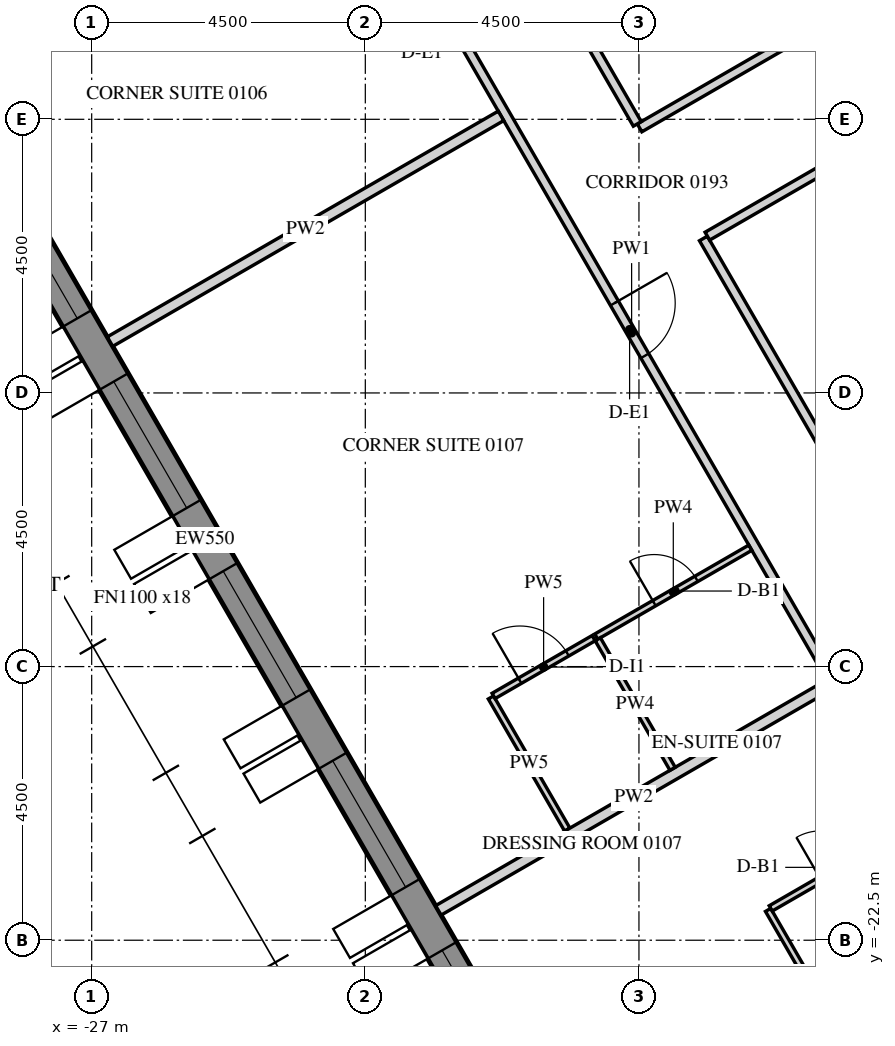
"""IFC4 building model, lengths in metres.
Left out: names, types, materials, properties, quantities, classifications, styles, units other than length and angle.
Written with IfcOpenShell. Run it as: python <this file> out.ifc"""

import sys

from ifc_helpers import new_model, si_unit, direction, frame, frame_2d, origin, place, context, subcontext, project, spatial, polyline, rectangle, outline, extrude, element, fill, save


model = new_model("IFC4")
c1 = context("Model", 3, precision=1e-05, world=origin(), true_north=direction((0.0, 1.0)))
c2 = subcontext(c1, "Body", "Model", "MODEL_VIEW")
j1 = project(units=[si_unit("LENGTHUNIT", "METRE"), si_unit("PLANEANGLEUNIT", "RADIAN")], contexts=[c1])
p1 = place(None, origin())
s1 = spatial("IfcSite", under=j1, at=p1, CompositionType="ELEMENT")
p2 = place(p1, origin())
s2 = spatial("IfcBuilding", under=s1, at=p2, CompositionType="ELEMENT")
p3 = place(p2, frame((0.0, 0.0, 37.5)))
s3 = spatial("IfcBuildingStorey", under=s2, at=p3, CompositionType="ELEMENT", Elevation=37.5)
p4 = place(p3, frame((-32.655, -2.89, -0.15), z_axis=(0.0, 0.0, 1.0), x_axis=(0.499997711317, -0.866026725152, 0.0)))
e1 = element("IfcWall", 1, at=p4, inside=s3, PredefinedType="SOLIDWALL", context=c2, shape_type="SweptSolid", body=[
    extrude(outline(polyline([(-0.022, -0.275), (30.097, -0.275), (30.045, 0.275), (0.022, 0.275), (-0.022, -0.275)])), origin(), (0.0, 0.0, 1.0), 3.9),
])
p5 = place(p4, frame((1.236, 0.0, 1.05)))
e2 = element("IfcOpeningElement", 2, at=p5, cuts=e1, PredefinedType="OPENING", context=c2, shape_type="SweptSolid", body=[
    extrude(rectangle(XDim=2.4, YDim=2.4, at=frame_2d((1.2, 1.2))), frame((0.0, 0.285, 0.0), z_axis=(0.0, -1.0, 0.0), x_axis=(1.0, 0.0, 0.0)), (0.0, 0.0, 1.0), 0.57),
])
p6 = place(p4, frame((4.835, 0.0, 1.05)))
e3 = element("IfcOpeningElement", 3, at=p6, cuts=e1, PredefinedType="OPENING", context=c2, shape_type="SweptSolid", body=[
    extrude(rectangle(XDim=2.4, YDim=2.4, at=frame_2d((1.2, 1.2))), frame((0.0, 0.285, 0.0), z_axis=(0.0, -1.0, 0.0), x_axis=(1.0, 0.0, 0.0)), (0.0, 0.0, 1.0), 0.57),
])
p7 = place(p4, frame((8.436, 0.0, 1.05)))
e4 = element("IfcOpeningElement", 4, at=p7, cuts=e1, PredefinedType="OPENING", context=c2, shape_type="SweptSolid", body=[
    extrude(rectangle(XDim=2.4, YDim=2.4, at=frame_2d((1.2, 1.2))), frame((0.0, 0.285, 0.0), z_axis=(0.0, -1.0, 0.0), x_axis=(1.0, 0.0, 0.0)), (0.0, 0.0, 1.0), 0.57),
])
p8 = place(p4, frame((12.035, 0.0, 1.05)))
e5 = element("IfcOpeningElement", 5, at=p8, cuts=e1, PredefinedType="OPENING", context=c2, shape_type="SweptSolid", body=[
    extrude(rectangle(XDim=2.4, YDim=2.4, at=frame_2d((1.2, 1.2))), frame((0.0, 0.285, 0.0), z_axis=(0.0, -1.0, 0.0), x_axis=(1.0, 0.0, 0.0)), (0.0, 0.0, 1.0), 0.57),
])
p9 = place(p4, frame((15.635, 0.0, 1.05)))
e6 = element("IfcOpeningElement", 6, at=p9, cuts=e1, PredefinedType="OPENING", context=c2, shape_type="SweptSolid", body=[
    extrude(rectangle(XDim=2.4, YDim=2.4, at=frame_2d((1.2, 1.2))), frame((0.0, 0.285, 0.0), z_axis=(0.0, -1.0, 0.0), x_axis=(1.0, 0.0, 0.0)), (0.0, 0.0, 1.0), 0.57),
])
p10 = place(p4, frame((19.236, 0.0, 1.05)))
e7 = element("IfcOpeningElement", 7, at=p10, cuts=e1, PredefinedType="OPENING", context=c2, shape_type="SweptSolid", body=[
    extrude(rectangle(XDim=2.4, YDim=2.4, at=frame_2d((1.2, 1.2))), frame((0.0, 0.285, 0.0), z_axis=(0.0, -1.0, 0.0), x_axis=(1.0, 0.0, 0.0)), (0.0, 0.0, 1.0), 0.57),
])
p11 = place(p4, frame((22.835, 0.0, 1.05)))
e8 = element("IfcOpeningElement", 8, at=p11, cuts=e1, PredefinedType="OPENING", context=c2, shape_type="SweptSolid", body=[
    extrude(rectangle(XDim=2.4, YDim=2.4, at=frame_2d((1.2, 1.2))), frame((0.0, 0.285, 0.0), z_axis=(0.0, -1.0, 0.0), x_axis=(1.0, 0.0, 0.0)), (0.0, 0.0, 1.0), 0.57),
])
p12 = place(p4, frame((26.436, 0.0, 1.05)))
e9 = element("IfcOpeningElement", 9, at=p12, cuts=e1, PredefinedType="OPENING", context=c2, shape_type="SweptSolid", body=[
    extrude(rectangle(XDim=2.4, YDim=2.4, at=frame_2d((1.2, 1.2))), frame((0.0, 0.285, 0.0), z_axis=(0.0, -1.0, 0.0), x_axis=(1.0, 0.0, 0.0)), (0.0, 0.0, 1.0), 0.57),
])
p13 = place(p3, frame((-15.819, 0.0, -0.15), z_axis=(0.0, 0.0, 1.0), x_axis=(0.499999880136, -0.866025472988, 0.0)))
e10 = element("IfcWall", 10, at=p13, inside=s3, PredefinedType="SHEAR", context=c2, shape_type="SweptSolid", body=[
    extrude(outline(polyline([(-0.173, -0.3), (15.993, -0.3), (15.646, 0.3), (0.173, 0.3), (-0.173, -0.3)])), origin(), (0.0, 0.0, 1.0), 3.9),
])
p14 = place(p13, frame((6.981, 0.0, 0.15)))
e11 = element("IfcOpeningElement", 11, at=p14, cuts=e10, PredefinedType="OPENING", context=c2, shape_type="SweptSolid", body=[
    extrude(rectangle(XDim=1.8, YDim=2.4, at=frame_2d((0.9, 1.2))), frame((0.0, 0.31, 0.0), z_axis=(0.0, -1.0, 0.0), x_axis=(1.0, 0.0, 0.0)), (0.0, 0.0, 1.0), 0.62),
])
p15 = place(p3, frame((-24.09, -2.175, 0.0), z_axis=(0.0, 0.0, 1.0), x_axis=(0.499996832073, -0.86602723278, 0.0)))
e12 = element("IfcWall", 12, at=p15, inside=s3, PredefinedType="PARTITIONING", context=c2, shape_type="SweptSolid", body=[
    extrude(rectangle(XDim=23.877, YDim=0.15, at=frame_2d((11.938, 0.0))), origin(), (0.0, 0.0, 1.0), 2.988),
])
p16 = place(p15, frame((4.543, 0.0, 0.0)))
e13 = element("IfcOpeningElement", 13, at=p16, cuts=e12, PredefinedType="OPENING", context=c2, shape_type="SweptSolid", body=[
    extrude(rectangle(XDim=1.0, YDim=2.1, at=frame_2d((0.5, 1.05))), frame((0.0, 0.085, 0.0), z_axis=(0.0, -1.0, 0.0), x_axis=(1.0, 0.0, 0.0)), (0.0, 0.0, 1.0), 0.17),
])
p17 = place(p15, frame((11.372, 0.0, 0.0)))
e14 = element("IfcOpeningElement", 14, at=p17, cuts=e12, PredefinedType="OPENING", context=c2, shape_type="SweptSolid", body=[
    extrude(rectangle(XDim=1.0, YDim=2.1, at=frame_2d((0.5, 1.05))), frame((0.0, 0.085, 0.0), z_axis=(0.0, -1.0, 0.0), x_axis=(1.0, 0.0, 0.0)), (0.0, 0.0, 1.0), 0.17),
])
p18 = place(p15, frame((19.425, 0.0, 0.0)))
e15 = element("IfcOpeningElement", 15, at=p18, cuts=e12, PredefinedType="OPENING", context=c2, shape_type="SweptSolid", body=[
    extrude(rectangle(XDim=1.0, YDim=2.1, at=frame_2d((0.5, 1.05))), frame((0.0, 0.085, 0.0), z_axis=(0.0, -1.0, 0.0), x_axis=(1.0, 0.0, 0.0)), (0.0, 0.0, 1.0), 0.17),
])
p19 = place(p3, frame((-12.664, -6.066, 0.0), z_axis=(0.0, 0.0, 1.0), x_axis=(-0.866023618125, -0.500003092839, 0.0)))
e16 = element("IfcWall", 16, at=p19, inside=s3, PredefinedType="PARTITIONING", context=c2, shape_type="SweptSolid", body=[
    extrude(rectangle(XDim=6.15, YDim=0.15, at=frame_2d((3.075, 0.0))), origin(), (0.0, 0.0, 1.0), 2.988),
])
p20 = place(p3, frame((-18.027, -9.076, 0.0), z_axis=(0.0, 0.0, 1.0), x_axis=(-0.500007318041, 0.86602117867, 0.0)))
e17 = element("IfcWall", 17, at=p20, inside=s3, PredefinedType="PARTITIONING", context=c2, shape_type="SweptSolid", body=[
    extrude(rectangle(XDim=8.383, YDim=0.15, at=frame_2d((4.191, 0.0))), origin(), (0.0, 0.0, 1.0), 2.988),
])
p21 = place(p20, frame((3.742, 0.0, 0.0)))
e18 = element("IfcOpeningElement", 18, at=p21, cuts=e17, PredefinedType="OPENING", context=c2, shape_type="SweptSolid", body=[
    extrude(rectangle(XDim=0.9, YDim=2.1, at=frame_2d((0.45, 1.05))), frame((0.0, 0.085, 0.0), z_axis=(0.0, -1.0, 0.0), x_axis=(1.0, 0.0, 0.0)), (0.0, 0.0, 1.0), 0.17),
])
p22 = place(p3, frame((-11.197, -20.907, 0.0), z_axis=(0.0, 0.0, 1.0), x_axis=(-0.500004557924, 0.86602277225, 0.0)))
e19 = element("IfcWall", 19, at=p22, inside=s3, PredefinedType="PARTITIONING", context=c2, shape_type="SweptSolid", body=[
    extrude(rectangle(XDim=11.487, YDim=0.15, at=frame_2d((5.743, 0.0))), origin(), (0.0, 0.0, 1.0), 2.988),
])
p23 = place(p22, frame((5.293, 0.0, 0.0)))
e20 = element("IfcOpeningElement", 20, at=p23, cuts=e19, PredefinedType="OPENING", context=c2, shape_type="SweptSolid", body=[
    extrude(rectangle(XDim=0.9, YDim=2.1, at=frame_2d((0.45, 1.05))), frame((0.0, 0.085, 0.0), z_axis=(0.0, -1.0, 0.0), x_axis=(1.0, 0.0, 0.0)), (0.0, 0.0, 1.0), 0.17),
])
p24 = place(p3, frame((-16.875, -10.922, 0.0), z_axis=(0.0, 0.0, 1.0), x_axis=(0.866023634079, 0.500003065207, 0.0)))
e21 = element("IfcWall", 21, at=p24, inside=s3, PredefinedType="PARTITIONING", context=c2, shape_type="SweptSolid", body=[
    extrude(rectangle(XDim=6.075, YDim=0.15, at=frame_2d((3.038, 0.0))), origin(), (0.0, 0.0, 1.0), 2.988),
])
p25 = place(p3, frame((-26.699, -12.656, 0.0), z_axis=(0.0, 0.0, 1.0), x_axis=(0.866028983062, 0.499993800457, 0.0)))
e22 = element("IfcWall", 22, at=p25, inside=s3, PredefinedType="PARTITIONING", context=c2, shape_type="SweptSolid", body=[
    extrude(rectangle(XDim=7.425, YDim=0.18, at=frame_2d((3.712, 0.0))), origin(), (0.0, 0.0, 1.0), 2.988),
])
p26 = place(p3, frame((-18.702, -17.508, 0.0), z_axis=(0.0, 0.0, 1.0), x_axis=(0.86601045545, 0.500025890382, 0.0)))
e23 = element("IfcWall", 23, at=p26, inside=s3, PredefinedType="PARTITIONING", context=c2, shape_type="SweptSolid", body=[
    extrude(rectangle(XDim=2.925, YDim=0.1, at=frame_2d((1.462, 0.0))), origin(), (0.0, 0.0, 1.0), 2.988),
])
p27 = place(p26, frame((1.1, 0.0, 0.0)))
e24 = element("IfcOpeningElement", 24, at=p27, cuts=e23, PredefinedType="OPENING", context=c2, shape_type="SweptSolid", body=[
    extrude(rectangle(XDim=0.8, YDim=2.1, at=frame_2d((0.4, 1.05))), frame((0.0, 0.06, 0.0), z_axis=(0.0, -1.0, 0.0), x_axis=(1.0, 0.0, 0.0)), (0.0, 0.0, 1.0), 0.12),
])
p28 = place(p3, frame((-19.179, -20.681, 0.0), z_axis=(0.0, 0.0, 1.0), x_axis=(-0.499989096993, 0.866031698547, 0.0)))
e25 = element("IfcWall", 25, at=p28, inside=s3, PredefinedType="PARTITIONING", context=c2, shape_type="SweptSolid", body=[
    extrude(rectangle(XDim=2.51, YDim=0.1, at=frame_2d((1.255, 0.0))), origin(), (0.0, 0.0, 1.0), 2.988),
])
p29 = place(p3, frame((-20.391, -18.482, 0.0), z_axis=(0.0, 0.0, 1.0), x_axis=(0.866044365799, 0.499967155389, 0.0)))
e26 = element("IfcWall", 26, at=p29, inside=s3, PredefinedType="PARTITIONING", context=c2, shape_type="SweptSolid", body=[
    extrude(rectangle(XDim=1.9, YDim=0.1, at=frame_2d((0.95, 0.0))), origin(), (0.0, 0.0, 1.0), 2.988),
])
p30 = place(p29, frame((0.5, 0.0, 0.0)))
e27 = element("IfcOpeningElement", 27, at=p30, cuts=e26, PredefinedType="OPENING", context=c2, shape_type="SweptSolid", body=[
    extrude(rectangle(XDim=0.9, YDim=2.1, at=frame_2d((0.45, 1.05))), frame((0.0, 0.06, 0.0), z_axis=(0.0, -1.0, 0.0), x_axis=(1.0, 0.0, 0.0)), (0.0, 0.0, 1.0), 0.12),
])
p31 = place(p3, frame((-21.299, -22.009, 0.0), z_axis=(0.0, 0.0, 1.0), x_axis=(0.866014745021, 0.500018461065, 0.0)))
e28 = element("IfcWall", 28, at=p31, inside=s3, PredefinedType="PARTITIONING", context=c2, shape_type="SweptSolid", body=[
    extrude(rectangle(XDim=7.425, YDim=0.18, at=frame_2d((3.712, 0.0))), origin(), (0.0, 0.0, 1.0), 2.988),
])
p32 = place(p3, frame((-18.677, -17.551, 0.0), z_axis=(0.0, 0.0, 1.0), x_axis=(0.500003092839, -0.866023618125, 0.0)))
e29 = element("IfcWall", 29, at=p32, inside=s3, PredefinedType="PARTITIONING", context=c2, shape_type="SweptSolid", body=[
    extrude(rectangle(XDim=2.46, YDim=0.1, at=frame_2d((1.23, 0.0))), origin(), (0.0, 0.0, 1.0), 2.988),
])
p33 = place(p3, frame((-14.601, -24.21, 0.0), z_axis=(0.0, 0.0, 1.0), x_axis=(-0.500062241894, 0.865989465428, 0.0)))
e30 = element("IfcWall", 30, at=p33, inside=s3, PredefinedType="PARTITIONING", context=c2, shape_type="SweptSolid", body=[
    extrude(rectangle(XDim=2.55, YDim=0.1, at=frame_2d((1.275, 0.0))), origin(), (0.0, 0.0, 1.0), 2.988),
])
p34 = place(p3, frame((-15.833, -21.977, 0.0), z_axis=(0.0, 0.0, 1.0), x_axis=(0.86604424267, 0.499967368674, 0.0)))
e31 = element("IfcWall", 31, at=p34, inside=s3, PredefinedType="PARTITIONING", context=c2, shape_type="SweptSolid", body=[
    extrude(rectangle(XDim=2.675, YDim=0.1, at=frame_2d((1.337, 0.0))), origin(), (0.0, 0.0, 1.0), 2.988),
])
p35 = place(p34, frame((0.95, 0.0, 0.0)))
e32 = element("IfcOpeningElement", 32, at=p35, cuts=e31, PredefinedType="OPENING", context=c2, shape_type="SweptSolid", body=[
    extrude(rectangle(XDim=0.8, YDim=2.1, at=frame_2d((0.4, 1.05))), frame((0.0, 0.06, 0.0), z_axis=(0.0, -1.0, 0.0), x_axis=(1.0, 0.0, 0.0)), (0.0, 0.0, 1.0), 0.12),
])
p36 = place(p3, frame((-15.983, -30.059, 0.0), z_axis=(0.0, 0.0, 1.0), x_axis=(0.469476547643, 0.882944942346, 0.0)))
e33 = element("IfcWall", 33, at=p36, inside=s3, PredefinedType="PARTITIONING", context=c2, shape_type="SweptSolid", body=[
    extrude(rectangle(XDim=8.073, YDim=0.1, at=frame_2d((4.037, 0.0))), origin(), (0.0, 0.0, 1.0), 2.988),
])
p37 = place(p36, frame((3.631, 0.0, 0.0)))
e34 = element("IfcOpeningElement", 34, at=p37, cuts=e33, PredefinedType="OPENING", context=c2, shape_type="SweptSolid", body=[
    extrude(rectangle(XDim=0.9, YDim=2.1, at=frame_2d((0.45, 1.05))), frame((0.0, 0.06, 0.0), z_axis=(0.0, -1.0, 0.0), x_axis=(1.0, 0.0, 0.0)), (0.0, 0.0, 1.0), 0.12),
])
p38 = place(p7, frame((0.0, 0.205, 0.0)))
e35 = element("IfcWindow", 35, at=p38, inside=s3, PartitioningType="DOUBLE_PANEL_VERTICAL", PredefinedType="WINDOW", context=c2, shape_type="SweptSolid", body=[
    extrude(rectangle(XDim=2.4, YDim=2.4, at=frame_2d((1.2, 1.2))), frame((0.0, 0.03, 0.0), z_axis=(0.0, -1.0, 0.0), x_axis=(1.0, 0.0, 0.0)), (0.0, 0.0, 1.0), 0.06),
])
fill(e4, e35)
p39 = place(p8, frame((0.0, 0.205, 0.0)))
e36 = element("IfcWindow", 36, at=p39, inside=s3, PartitioningType="DOUBLE_PANEL_VERTICAL", PredefinedType="WINDOW", context=c2, shape_type="SweptSolid", body=[
    extrude(rectangle(XDim=2.4, YDim=2.4, at=frame_2d((1.2, 1.2))), frame((0.0, 0.03, 0.0), z_axis=(0.0, -1.0, 0.0), x_axis=(1.0, 0.0, 0.0)), (0.0, 0.0, 1.0), 0.06),
])
fill(e5, e36)
p40 = place(p9, frame((0.0, 0.205, 0.0)))
e37 = element("IfcWindow", 37, at=p40, inside=s3, PartitioningType="DOUBLE_PANEL_VERTICAL", PredefinedType="WINDOW", context=c2, shape_type="SweptSolid", body=[
    extrude(rectangle(XDim=2.4, YDim=2.4, at=frame_2d((1.2, 1.2))), frame((0.0, 0.03, 0.0), z_axis=(0.0, -1.0, 0.0), x_axis=(1.0, 0.0, 0.0)), (0.0, 0.0, 1.0), 0.06),
])
fill(e6, e37)
p41 = place(p10, frame((0.0, 0.205, 0.0)))
e38 = element("IfcWindow", 38, at=p41, inside=s3, PartitioningType="DOUBLE_PANEL_VERTICAL", PredefinedType="WINDOW", context=c2, shape_type="SweptSolid", body=[
    extrude(rectangle(XDim=2.4, YDim=2.4, at=frame_2d((1.2, 1.2))), frame((0.0, 0.03, 0.0), z_axis=(0.0, -1.0, 0.0), x_axis=(1.0, 0.0, 0.0)), (0.0, 0.0, 1.0), 0.06),
])
fill(e7, e38)
p42 = place(p11, frame((0.0, 0.205, 0.0)))
e39 = element("IfcWindow", 39, at=p42, inside=s3, PartitioningType="DOUBLE_PANEL_VERTICAL", PredefinedType="WINDOW", context=c2, shape_type="SweptSolid", body=[
    extrude(rectangle(XDim=2.4, YDim=2.4, at=frame_2d((1.2, 1.2))), frame((0.0, 0.03, 0.0), z_axis=(0.0, -1.0, 0.0), x_axis=(1.0, 0.0, 0.0)), (0.0, 0.0, 1.0), 0.06),
])
fill(e8, e39)
p43 = place(p17, origin())
e40 = element("IfcDoor", 40, at=p43, inside=s3, OperationType="SINGLE_SWING_RIGHT", PredefinedType="DOOR", context=c2, shape_type="SweptSolid", body=[
    extrude(rectangle(XDim=1.0, YDim=2.1, at=frame_2d((0.5, 1.05))), frame((0.0, 0.025, 0.0), z_axis=(0.0, -1.0, 0.0), x_axis=(1.0, 0.0, 0.0)), (0.0, 0.0, 1.0), 0.05),
])
fill(e14, e40)
p44 = place(p27, origin())
e41 = element("IfcDoor", 41, at=p44, inside=s3, OperationType="SINGLE_SWING_LEFT", PredefinedType="DOOR", context=c2, shape_type="SweptSolid", body=[
    extrude(rectangle(XDim=0.8, YDim=2.1, at=frame_2d((0.4, 1.05))), frame((0.0, 0.025, 0.0), z_axis=(0.0, -1.0, 0.0), x_axis=(1.0, 0.0, 0.0)), (0.0, 0.0, 1.0), 0.05),
])
fill(e24, e41)
p45 = place(p30, origin())
e42 = element("IfcDoor", 42, at=p45, inside=s3, OperationType="SINGLE_SWING_RIGHT", PredefinedType="DOOR", context=c2, shape_type="SweptSolid", body=[
    extrude(rectangle(XDim=0.9, YDim=2.1, at=frame_2d((0.45, 1.05))), frame((0.0, 0.025, 0.0), z_axis=(0.0, -1.0, 0.0), x_axis=(1.0, 0.0, 0.0)), (0.0, 0.0, 1.0), 0.05),
])
fill(e27, e42)
save(model, sys.argv[1])
